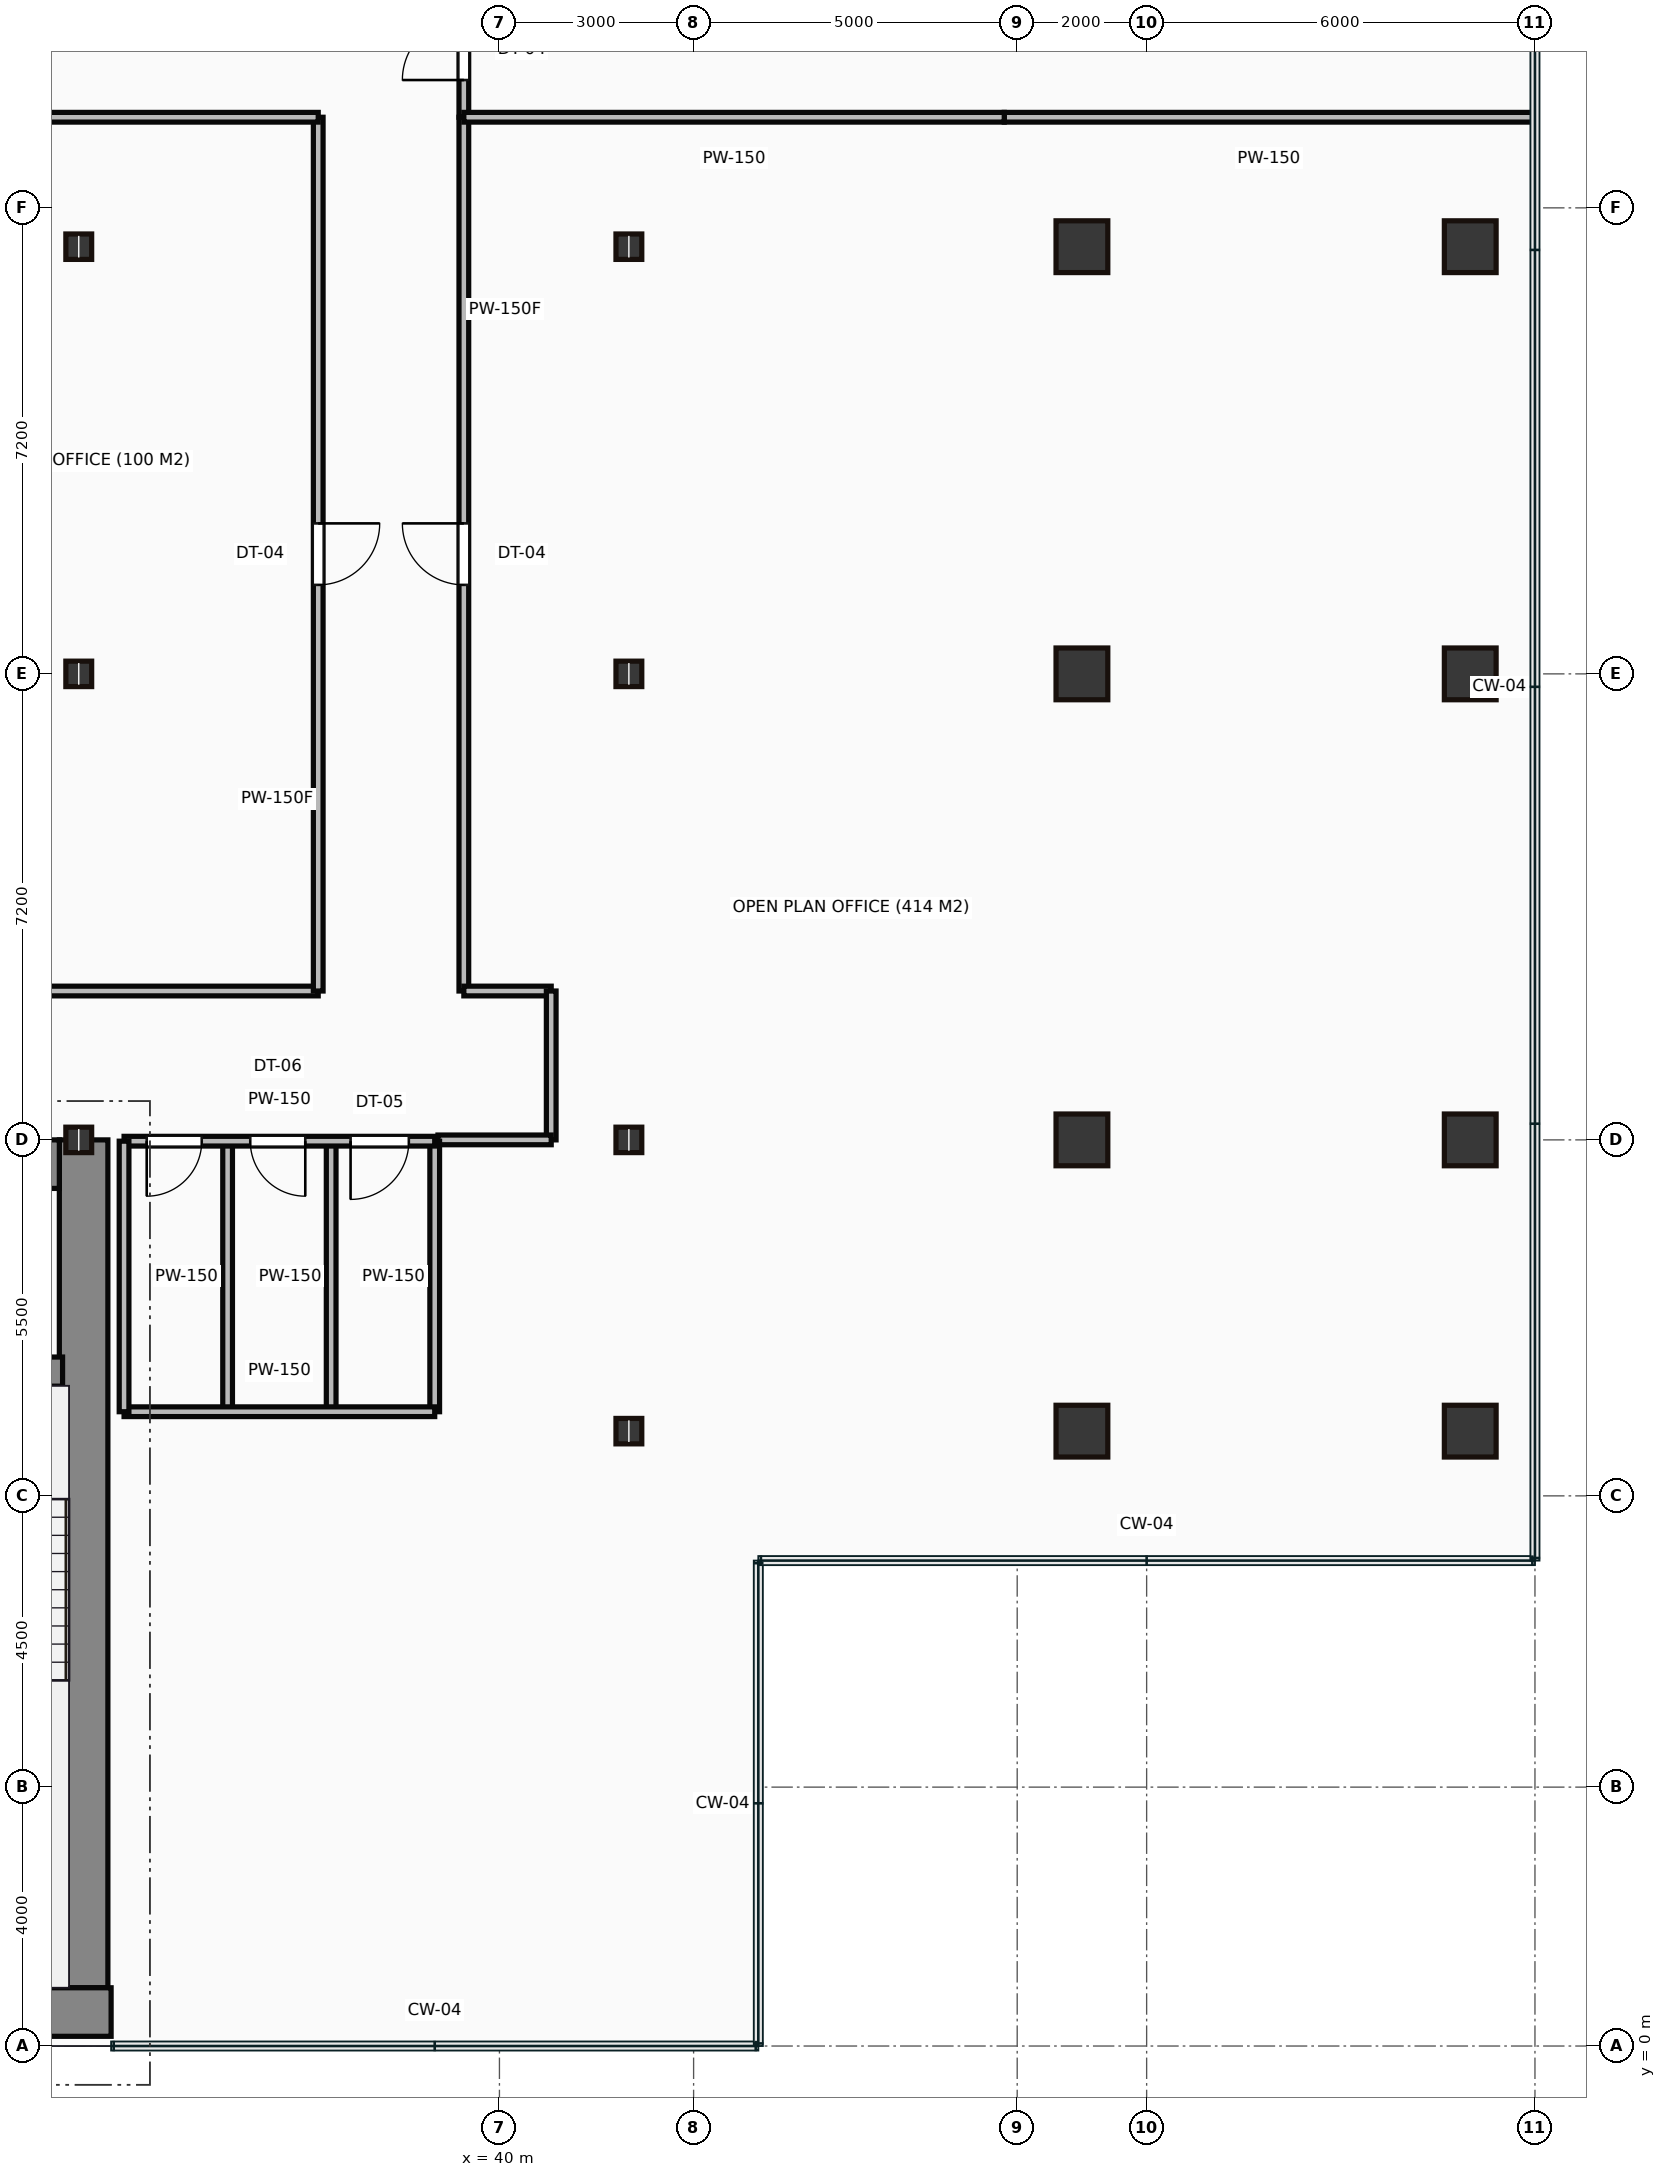
"""IFC4 building model, lengths in metres.
Left out: names, types, materials, properties, quantities, classifications, styles, units other than length and angle.
Written with IfcOpenShell. Run it as: python <this file> out.ifc"""

import sys

from ifc_helpers import new_model, si_unit, direction, frame, frame_2d, origin, origin_2d, place, context, subcontext, project, spatial, rectangle, hollow_rectangle, i_section, extrude, source, transform, mapped, element, fill, save


model = new_model("IFC4")
c1 = context("Model", 3, precision=1e-05, world=origin(), true_north=direction((0.0, 1.0)))
c2 = subcontext(c1, "Body", "Model", "MODEL_VIEW")
j1 = project(units=[si_unit("LENGTHUNIT", "METRE"), si_unit("PLANEANGLEUNIT", "RADIAN")], contexts=[c1])
p1 = place(None, origin())
s1 = spatial("IfcSite", under=j1, at=p1, CompositionType="ELEMENT")
p2 = place(p1, origin())
s2 = spatial("IfcBuilding", under=s1, at=p2, CompositionType="ELEMENT")
p3 = place(p2, frame((0.0, 0.0, 121.5)))
s3 = spatial("IfcBuildingStorey", under=s2, at=p3, CompositionType="ELEMENT", Elevation=121.5)
m1 = source(origin(), c2, "Body", "SweptSolid", [
    extrude(rectangle(XDim=29.5, YDim=0.75, at=frame_2d((14.75, 0.0))), origin(), (0.0, 0.0, 1.0), 3.65),
])
p4 = place(p3, frame((4.5, 0.525, 0.0), z_axis=(0.0, 0.0, 1.0), x_axis=(1.0, 0.0, 0.0)))
e1 = element("IfcWall", 1, at=p4, inside=s3, PredefinedType="SHEAR", context=c2, shape_type="MappedRepresentation", body=[
    mapped(m1, transform((0.0, 0.0, 0.0))),
])
m2 = source(origin(), c2, "Body", "SweptSolid", [
    extrude(rectangle(XDim=13.1, YDim=0.75, at=frame_2d((6.55, 0.0))), origin(), (0.0, 0.0, 1.0), 3.65),
])
p5 = place(p3, frame((33.575, 0.9, 0.0), z_axis=(0.0, 0.0, 1.0), x_axis=(0.0, 1.0, 0.0)))
e2 = element("IfcWall", 2, at=p5, inside=s3, PredefinedType="SHEAR", context=c2, shape_type="MappedRepresentation", body=[
    mapped(m2, transform((0.0, 0.0, 0.0))),
])
m3 = source(origin(), c2, "Body", "SweptSolid", [
    extrude(rectangle(XDim=12.6, YDim=0.75, at=frame_2d((6.3, 0.0))), origin(), (0.0, 0.0, 1.0), 3.65),
])
p6 = place(p3, frame((20.6, 13.625, 0.0), z_axis=(0.0, 0.0, 1.0), x_axis=(1.0, 0.0, 0.0)))
e3 = element("IfcWall", 3, at=p6, inside=s3, PredefinedType="SHEAR", context=c2, shape_type="MappedRepresentation", body=[
    mapped(m3, transform((0.0, 0.0, 0.0))),
])
p7 = place(p6, frame((9.25, 0.0, 0.0)))
e4 = element("IfcOpeningElement", 4, at=p7, cuts=e3, PredefinedType="OPENING", context=c2, shape_type="SweptSolid", body=[
    extrude(rectangle(XDim=1.1, YDim=2.15, at=frame_2d((0.55, 1.075))), frame((0.0, 0.385, 0.0), z_axis=(0.0, -1.0, 0.0), x_axis=(1.0, 0.0, 0.0)), (0.0, 0.0, 1.0), 0.77),
])
m4 = source(origin(), c2, "Body", "SweptSolid", [
    extrude(rectangle(XDim=3.39, YDim=0.45, at=frame_2d((1.695, 0.0))), origin(), (0.0, 0.0, 1.0), 3.65),
])
p8 = place(p3, frame((29.86, 10.42, 0.0), z_axis=(0.0, 0.0, 1.0), x_axis=(1.0, 0.0, 0.0)))
e5 = element("IfcWall", 5, at=p8, inside=s3, PredefinedType="SHEAR", context=c2, shape_type="MappedRepresentation", body=[
    mapped(m4, transform((0.0, 0.0, 0.0))),
])
p9 = place(p8, frame((1.1, 0.0, 0.0)))
e6 = element("IfcOpeningElement", 6, at=p9, cuts=e5, PredefinedType="OPENING", context=c2, shape_type="SweptSolid", body=[
    extrude(rectangle(XDim=1.1, YDim=2.15, at=frame_2d((0.55, 1.075))), frame((0.0, 0.235, 0.0), z_axis=(0.0, -1.0, 0.0), x_axis=(1.0, 0.0, 0.0)), (0.0, 0.0, 1.0), 0.47),
])
m5 = source(origin(), c2, "Body", "SweptSolid", [
    extrude(i_section(OverallWidth=0.399, OverallDepth=0.393, WebThickness=0.023, FlangeThickness=0.037, at=origin_2d()), origin(), (0.0, 0.0, 1.0), 3.65),
])
for number, where, z_axis, x_axis in (
    (7, (33.5, 14.0, 0.0), (0.0, 0.0, 1.0), (1.0, 0.0, 0.0)),
    (8, (33.5, 21.2, 0.0), (0.0, 0.0, 1.0), (1.0, 0.0, 0.0)),
    (9, (33.5, 27.8, 0.0), (0.0, 0.0, 1.0), (1.0, 0.0, 0.0)),
    (10, (42.0, 9.5, 0.0), (0.0, 0.0, 1.0), (1.0, 0.0, 0.0)),
    (11, (42.0, 14.0, 0.0), (0.0, 0.0, 1.0), (1.0, 0.0, 0.0)),
    (12, (42.0, 21.2, 0.0), (0.0, 0.0, 1.0), (1.0, 0.0, 0.0)),
    (13, (42.0, 27.8, 0.0), (0.0, 0.0, 1.0), (1.0, 0.0, 0.0)),
):
    element("IfcColumn", number, at=place(p3, frame(where, z_axis=z_axis, x_axis=x_axis)), inside=s3, PredefinedType="COLUMN", context=c2, shape_type="MappedRepresentation", body=[
        mapped(m5, transform((0.0, 0.0, 0.0))),
    ])
m6 = source(origin(), c2, "Body", "SweptSolid", [
    extrude(hollow_rectangle(XDim=0.8, YDim=0.8, WallThickness=0.04, at=origin_2d()), origin(), (0.0, 0.0, 1.0), 3.65),
])
for number, where, z_axis, x_axis in (
    (14, (49.0, 9.5, 0.0), (0.0, 0.0, 1.0), (1.0, 0.0, 0.0)),
    (15, (49.0, 14.0, 0.0), (0.0, 0.0, 1.0), (1.0, 0.0, 0.0)),
    (16, (49.0, 21.2, 0.0), (0.0, 0.0, 1.0), (1.0, 0.0, 0.0)),
    (17, (49.0, 27.8, 0.0), (0.0, 0.0, 1.0), (1.0, 0.0, 0.0)),
    (18, (55.0, 9.5, 0.0), (0.0, 0.0, 1.0), (1.0, 0.0, 0.0)),
    (19, (55.0, 14.0, 0.0), (0.0, 0.0, 1.0), (1.0, 0.0, 0.0)),
    (20, (55.0, 21.2, 0.0), (0.0, 0.0, 1.0), (1.0, 0.0, 0.0)),
    (21, (55.0, 27.8, 0.0), (0.0, 0.0, 1.0), (1.0, 0.0, 0.0)),
):
    element("IfcColumn", number, at=place(p3, frame(where, z_axis=z_axis, x_axis=x_axis)), inside=s3, PredefinedType="COLUMN", context=c2, shape_type="MappedRepresentation", body=[
        mapped(m6, transform((0.0, 0.0, 0.0))),
    ])
m7 = source(origin(), c2, "Body", "SweptSolid", [
    extrude(rectangle(XDim=4.8, YDim=0.15, at=frame_2d((2.4, 0.0))), origin(), (0.0, 0.0, 1.0), 2.702),
])
p10 = place(p3, frame((34.2, 13.98, 0.0), z_axis=(0.0, 0.0, 1.0), x_axis=(1.0, 0.0, 0.0)))
e22 = element("IfcWall", 22, at=p10, inside=s3, PredefinedType="PARTITIONING", context=c2, shape_type="MappedRepresentation", body=[
    mapped(m7, transform((0.0, 0.0, 0.0))),
])
p11 = place(p10, frame((0.35, 0.0, 0.0)))
e23 = element("IfcOpeningElement", 23, at=p11, cuts=e22, PredefinedType="OPENING", context=c2, shape_type="SweptSolid", body=[
    extrude(rectangle(XDim=0.85, YDim=2.1, at=frame_2d((0.425, 1.05))), frame((0.0, 0.085, 0.0), z_axis=(0.0, -1.0, 0.0), x_axis=(1.0, 0.0, 0.0)), (0.0, 0.0, 1.0), 0.17),
])
p12 = place(p10, frame((1.95, 0.0, 0.0)))
e24 = element("IfcOpeningElement", 24, at=p12, cuts=e22, PredefinedType="OPENING", context=c2, shape_type="SweptSolid", body=[
    extrude(rectangle(XDim=0.85, YDim=2.1, at=frame_2d((0.425, 1.05))), frame((0.0, 0.085, 0.0), z_axis=(0.0, -1.0, 0.0), x_axis=(1.0, 0.0, 0.0)), (0.0, 0.0, 1.0), 0.17),
])
p13 = place(p10, frame((3.5, 0.0, 0.0)))
e25 = element("IfcOpeningElement", 25, at=p13, cuts=e22, PredefinedType="OPENING", context=c2, shape_type="SweptSolid", body=[
    extrude(rectangle(XDim=0.9, YDim=2.1, at=frame_2d((0.45, 1.05))), frame((0.0, 0.085, 0.0), z_axis=(0.0, -1.0, 0.0), x_axis=(1.0, 0.0, 0.0)), (0.0, 0.0, 1.0), 0.17),
])
m8 = source(origin(), c2, "Body", "SweptSolid", [
    extrude(rectangle(XDim=4.8, YDim=0.15, at=frame_2d((2.4, 0.0))), origin(), (0.0, 0.0, 1.0), 3.4),
])
p14 = place(p3, frame((34.2, 9.8, 0.0), z_axis=(0.0, 0.0, 1.0), x_axis=(1.0, 0.0, 0.0)))
e26 = element("IfcWall", 26, at=p14, inside=s3, PredefinedType="PARTITIONING", context=c2, shape_type="MappedRepresentation", body=[
    mapped(m8, transform((0.0, 0.0, 0.0))),
])
m9 = source(origin(), c2, "Body", "SweptSolid", [
    extrude(rectangle(XDim=4.18, YDim=0.15, at=frame_2d((2.09, 0.0))), origin(), (0.0, 0.0, 1.0), 3.4),
])
for number, where, z_axis, x_axis in (
    (27, (39.0, 9.8, 0.0), (0.0, 0.0, 1.0), (0.0, 1.0, 0.0)),
    (28, (34.2, 9.8, 0.0), (0.0, 0.0, 1.0), (0.0, 1.0, 0.0)),
    (29, (35.8, 9.8, 0.0), (0.0, 0.0, 1.0), (0.0, 1.0, 0.0)),
    (30, (37.4, 9.8, 0.0), (0.0, 0.0, 1.0), (0.0, 1.0, 0.0)),
):
    element("IfcWall", number, at=place(p3, frame(where, z_axis=z_axis, x_axis=x_axis)), inside=s3, PredefinedType="PARTITIONING", context=c2, shape_type="MappedRepresentation", body=[
        mapped(m9, transform((0.0, 0.0, 0.0))),
    ])
m10 = source(origin(), c2, "Body", "SweptSolid", [
    extrude(rectangle(XDim=32.6, YDim=0.15, at=frame_2d((16.3, 0.0))), origin(), (0.0, 0.0, 1.0), 3.4),
])
p15 = place(p3, frame((4.6, 16.3, 0.0), z_axis=(0.0, 0.0, 1.0), x_axis=(1.0, 0.0, 0.0)))
e31 = element("IfcWall", 31, at=p15, inside=s3, PredefinedType="PARTITIONING", context=c2, shape_type="MappedRepresentation", body=[
    mapped(m10, transform((0.0, 0.0, 0.0))),
])
p16 = place(p15, frame((2.255, 0.0, 0.0)))
e32 = element("IfcOpeningElement", 32, at=p16, cuts=e31, PredefinedType="OPENING", context=c2, shape_type="SweptSolid", body=[
    extrude(rectangle(XDim=0.95, YDim=2.15, at=frame_2d((0.475, 1.075))), frame((0.0, 0.085, 0.0), z_axis=(0.0, -1.0, 0.0), x_axis=(1.0, 0.0, 0.0)), (0.0, 0.0, 1.0), 0.17),
])
m11 = source(origin(), c2, "Body", "SweptSolid", [
    extrude(rectangle(XDim=13.5, YDim=0.15, at=frame_2d((6.75, 0.0))), origin(), (0.0, 0.0, 1.0), 3.4),
])
p17 = place(p3, frame((37.2, 16.3, 0.0), z_axis=(0.0, 0.0, 1.0), x_axis=(0.0, 1.0, 0.0)))
e33 = element("IfcWall", 33, at=p17, inside=s3, PredefinedType="PARTITIONING", context=c2, shape_type="MappedRepresentation", body=[
    mapped(m11, transform((0.0, 0.0, 0.0))),
])
p18 = place(p17, frame((6.275, 0.0, 0.0)))
e34 = element("IfcOpeningElement", 34, at=p18, cuts=e33, PredefinedType="OPENING", context=c2, shape_type="SweptSolid", body=[
    extrude(rectangle(XDim=0.95, YDim=2.15, at=frame_2d((0.475, 1.075))), frame((0.0, 0.085, 0.0), z_axis=(0.0, -1.0, 0.0), x_axis=(1.0, 0.0, 0.0)), (0.0, 0.0, 1.0), 0.17),
])
p19 = place(p3, frame((37.2, 29.8, 0.0), z_axis=(0.0, 0.0, 1.0), x_axis=(-1.0, 0.0, 0.0)))
e35 = element("IfcWall", 35, at=p19, inside=s3, PredefinedType="PARTITIONING", context=c2, shape_type="MappedRepresentation", body=[
    mapped(m10, transform((0.0, 0.0, 0.0))),
])
p20 = place(p19, frame((22.025, 0.0, 0.0)))
e36 = element("IfcOpeningElement", 36, at=p20, cuts=e35, PredefinedType="OPENING", context=c2, shape_type="SweptSolid", body=[
    extrude(rectangle(XDim=0.95, YDim=2.15, at=frame_2d((0.475, 1.075))), frame((0.0, 0.085, 0.0), z_axis=(0.0, -1.0, 0.0), x_axis=(1.0, 0.0, 0.0)), (0.0, 0.0, 1.0), 0.17),
])
p21 = place(p19, frame((12.025, 0.0, 0.0)))
e37 = element("IfcOpeningElement", 37, at=p21, cuts=e35, PredefinedType="OPENING", context=c2, shape_type="SweptSolid", body=[
    extrude(rectangle(XDim=0.95, YDim=2.15, at=frame_2d((0.475, 1.075))), frame((0.0, 0.085, 0.0), z_axis=(0.0, -1.0, 0.0), x_axis=(1.0, 0.0, 0.0)), (0.0, 0.0, 1.0), 0.17),
])
m12 = source(origin(), c2, "Body", "SweptSolid", [
    extrude(rectangle(XDim=2.1, YDim=0.15, at=frame_2d((1.05, 0.0))), origin(), (0.0, 0.0, 1.0), 3.4),
])
p22 = place(p3, frame((39.45, 31.9, 0.0), z_axis=(0.0, 0.0, 1.0), x_axis=(0.0, -1.0, 0.0)))
e38 = element("IfcWall", 38, at=p22, inside=s3, PredefinedType="PARTITIONING", context=c2, shape_type="MappedRepresentation", body=[
    mapped(m12, transform((0.0, 0.0, 0.0))),
])
p23 = place(p22, frame((0.575, 0.0, 0.0)))
e39 = element("IfcOpeningElement", 39, at=p23, cuts=e38, PredefinedType="OPENING", context=c2, shape_type="SweptSolid", body=[
    extrude(rectangle(XDim=0.95, YDim=2.15, at=frame_2d((0.475, 1.075))), frame((0.0, 0.085, 0.0), z_axis=(0.0, -1.0, 0.0), x_axis=(1.0, 0.0, 0.0)), (0.0, 0.0, 1.0), 0.17),
])
p24 = place(p3, frame((39.45, 29.8, 0.0), z_axis=(0.0, 0.0, 1.0), x_axis=(0.0, -1.0, 0.0)))
e40 = element("IfcWall", 40, at=p24, inside=s3, PredefinedType="PARTITIONING", context=c2, shape_type="MappedRepresentation", body=[
    mapped(m11, transform((0.0, 0.0, 0.0))),
])
p25 = place(p24, frame((6.275, 0.0, 0.0)))
e41 = element("IfcOpeningElement", 41, at=p25, cuts=e40, PredefinedType="OPENING", context=c2, shape_type="SweptSolid", body=[
    extrude(rectangle(XDim=0.95, YDim=2.15, at=frame_2d((0.475, 1.075))), frame((0.0, 0.085, 0.0), z_axis=(0.0, -1.0, 0.0), x_axis=(1.0, 0.0, 0.0)), (0.0, 0.0, 1.0), 0.17),
])
m13 = source(origin(), c2, "Body", "SweptSolid", [
    extrude(rectangle(XDim=1.35, YDim=0.15, at=frame_2d((0.675, 0.0))), origin(), (0.0, 0.0, 1.0), 3.4),
])
p26 = place(p3, frame((39.45, 16.3, 0.0), z_axis=(0.0, 0.0, 1.0), x_axis=(1.0, 0.0, 0.0)))
e42 = element("IfcWall", 42, at=p26, inside=s3, PredefinedType="PARTITIONING", context=c2, shape_type="MappedRepresentation", body=[
    mapped(m13, transform((0.0, 0.0, 0.0))),
])
m14 = source(origin(), c2, "Body", "SweptSolid", [
    extrude(rectangle(XDim=2.3, YDim=0.15, at=frame_2d((1.15, 0.0))), origin(), (0.0, 0.0, 1.0), 3.4),
])
p27 = place(p3, frame((40.8, 16.3, 0.0), z_axis=(0.0, 0.0, 1.0), x_axis=(0.0, -1.0, 0.0)))
e43 = element("IfcWall", 43, at=p27, inside=s3, PredefinedType="PARTITIONING", context=c2, shape_type="MappedRepresentation", body=[
    mapped(m14, transform((0.0, 0.0, 0.0))),
])
m15 = source(origin(), c2, "Body", "SweptSolid", [
    extrude(rectangle(XDim=1.75, YDim=0.15, at=frame_2d((0.875, 0.0))), origin(), (0.0, 0.0, 1.0), 2.702),
])
p28 = place(p3, frame((40.8, 14.0, 0.0), z_axis=(0.0, 0.0, 1.0), x_axis=(-1.0, 0.0, 0.0)))
e44 = element("IfcWall", 44, at=p28, inside=s3, PredefinedType="PARTITIONING", context=c2, shape_type="MappedRepresentation", body=[
    mapped(m15, transform((0.0, 0.0, 0.0))),
])
m16 = source(origin(), c2, "Body", "SweptSolid", [
    extrude(rectangle(XDim=8.18, YDim=0.15, at=frame_2d((4.09, 0.0))), origin(), (0.0, 0.0, 1.0), 3.4),
])
p29 = place(p3, frame((55.98, 29.8, 0.0), z_axis=(0.0, 0.0, 1.0), x_axis=(-1.0, 0.0, 0.0)))
e45 = element("IfcWall", 45, at=p29, inside=s3, PredefinedType="PARTITIONING", context=c2, shape_type="MappedRepresentation", body=[
    mapped(m16, transform((0.0, 0.0, 0.0))),
])
m17 = source(origin(), c2, "Body", "SweptSolid", [
    extrude(rectangle(XDim=8.35, YDim=0.15, at=frame_2d((4.175, 0.0))), origin(), (0.0, 0.0, 1.0), 3.4),
])
p30 = place(p3, frame((47.8, 29.8, 0.0), z_axis=(0.0, 0.0, 1.0), x_axis=(-1.0, 0.0, 0.0)))
e46 = element("IfcWall", 46, at=p30, inside=s3, PredefinedType="PARTITIONING", context=c2, shape_type="MappedRepresentation", body=[
    mapped(m17, transform((0.0, 0.0, 0.0))),
])
m18 = source(origin(), c2, "Body", "SweptSolid", [
    extrude(rectangle(XDim=0.85, YDim=2.1, at=frame_2d((0.425, 1.05))), frame((0.0, 0.025, 0.0), z_axis=(0.0, -1.0, 0.0), x_axis=(1.0, 0.0, 0.0)), (0.0, 0.0, 1.0), 0.05),
])
p31 = place(p11, frame((0.85, 0.0, 0.0), z_axis=(0.0, 0.0, 1.0), x_axis=(-1.0, 0.0, 0.0)))
e47 = element("IfcDoor", 47, at=p31, inside=s3, OperationType="SINGLE_SWING_LEFT", PredefinedType="DOOR", context=c2, shape_type="MappedRepresentation", body=[
    mapped(m18, transform((0.0, 0.0, 0.0))),
])
fill(e23, e47)
p32 = place(p12, frame((0.85, 0.0, 0.0), z_axis=(0.0, 0.0, 1.0), x_axis=(-1.0, 0.0, 0.0)))
e48 = element("IfcDoor", 48, at=p32, inside=s3, OperationType="SINGLE_SWING_RIGHT", PredefinedType="DOOR", context=c2, shape_type="MappedRepresentation", body=[
    mapped(m18, transform((0.0, 0.0, 0.0))),
])
fill(e24, e48)
m19 = source(origin(), c2, "Body", "SweptSolid", [
    extrude(rectangle(XDim=0.9, YDim=2.1, at=frame_2d((0.45, 1.05))), frame((0.0, 0.025, 0.0), z_axis=(0.0, -1.0, 0.0), x_axis=(1.0, 0.0, 0.0)), (0.0, 0.0, 1.0), 0.05),
])
p33 = place(p13, frame((0.9, 0.0, 0.0), z_axis=(0.0, 0.0, 1.0), x_axis=(-1.0, 0.0, 0.0)))
e49 = element("IfcDoor", 49, at=p33, inside=s3, OperationType="SINGLE_SWING_LEFT", PredefinedType="DOOR", context=c2, shape_type="MappedRepresentation", body=[
    mapped(m19, transform((0.0, 0.0, 0.0))),
])
fill(e25, e49)
m20 = source(origin(), c2, "Body", "SweptSolid", [
    extrude(rectangle(XDim=0.95, YDim=2.15, at=frame_2d((0.475, 1.075))), frame((0.0, 0.025, 0.0), z_axis=(0.0, -1.0, 0.0), x_axis=(1.0, 0.0, 0.0)), (0.0, 0.0, 1.0), 0.05),
])
p34 = place(p18, origin())
e50 = element("IfcDoor", 50, at=p34, inside=s3, OperationType="SINGLE_SWING_RIGHT", PredefinedType="DOOR", context=c2, shape_type="MappedRepresentation", body=[
    mapped(m20, transform((0.0, 0.0, 0.0))),
])
fill(e34, e50)
p35 = place(p23, origin())
e51 = element("IfcDoor", 51, at=p35, inside=s3, OperationType="SINGLE_SWING_RIGHT", PredefinedType="DOOR", context=c2, shape_type="MappedRepresentation", body=[
    mapped(m20, transform((0.0, 0.0, 0.0))),
])
fill(e39, e51)
p36 = place(p25, origin())
e52 = element("IfcDoor", 52, at=p36, inside=s3, OperationType="SINGLE_SWING_LEFT", PredefinedType="DOOR", context=c2, shape_type="MappedRepresentation", body=[
    mapped(m20, transform((0.0, 0.0, 0.0))),
])
fill(e41, e52)
save(model, sys.argv[1])
